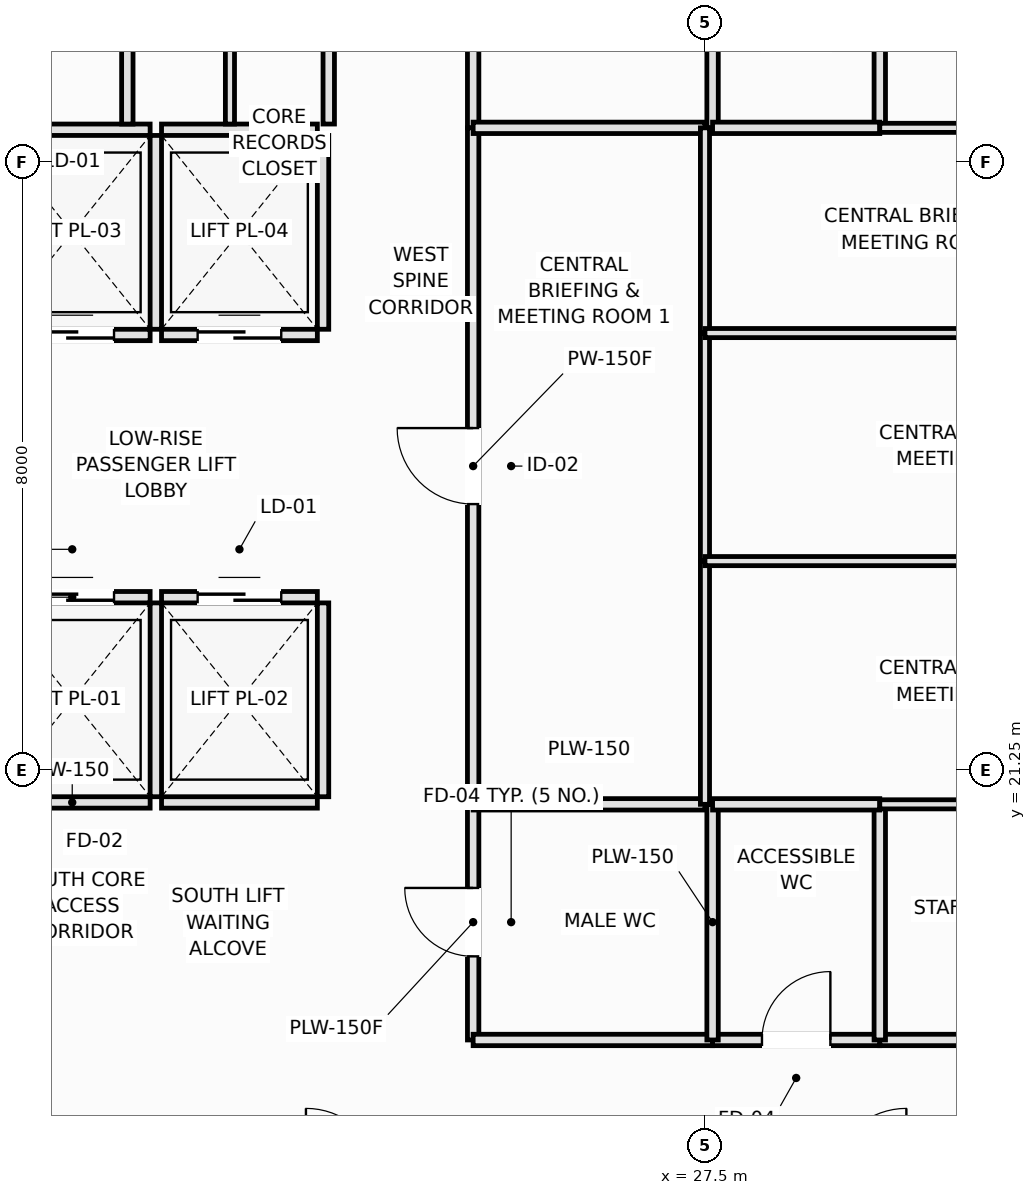
"""IFC4 building model, lengths in metres.
Left out: names, types, materials, properties, quantities, classifications, styles, units other than length and angle.
Written with IfcOpenShell. Run it as: python <this file> out.ifc"""

import sys

from ifc_helpers import new_model, si_unit, direction, frame, frame_2d, origin, place, context, subcontext, project, spatial, rectangle, extrude, element, fill, save


model = new_model("IFC4")
c1 = context("Model", 3, precision=1e-05, world=origin(), true_north=direction((0.0, 1.0)))
c2 = subcontext(c1, "Body", "Model", "MODEL_VIEW")
j1 = project(units=[si_unit("LENGTHUNIT", "METRE"), si_unit("PLANEANGLEUNIT", "RADIAN")], contexts=[c1])
p1 = place(None, origin())
s1 = spatial("IfcSite", under=j1, at=p1, CompositionType="ELEMENT")
p2 = place(p1, origin())
s2 = spatial("IfcBuilding", under=s1, at=p2, CompositionType="ELEMENT")
p3 = place(p2, frame((0.0, 0.0, 75.3)))
s3 = spatial("IfcBuildingStorey", under=s2, at=p3, CompositionType="ELEMENT", Elevation=75.3)
p4 = place(p3, frame((18.15, 20.825, 0.0), z_axis=(0.0, 0.0, 1.0), x_axis=(1.0, 0.0, 0.0)))
e1 = element("IfcWall", 1, at=p4, inside=s3, PredefinedType="PARTITIONING", context=c2, shape_type="SweptSolid", body=[
    extrude(rectangle(XDim=2.05, YDim=0.15, at=frame_2d((1.025, 0.0))), origin(), (0.0, 0.0, 1.0), 3.37),
])
p5 = place(p3, frame((18.15, 23.525, 0.0), z_axis=(0.0, 0.0, 1.0), x_axis=(1.0, 0.0, 0.0)))
e2 = element("IfcWall", 2, at=p5, inside=s3, PredefinedType="PARTITIONING", context=c2, shape_type="SweptSolid", body=[
    extrude(rectangle(XDim=2.05, YDim=0.15, at=frame_2d((1.025, 0.0))), origin(), (0.0, 0.0, 1.0), 3.37),
])
p6 = place(p5, frame((0.475, 0.0, 0.0)))
e3 = element("IfcOpeningElement", 3, at=p6, cuts=e2, PredefinedType="OPENING", context=c2, shape_type="SweptSolid", body=[
    extrude(rectangle(XDim=1.1, YDim=2.2, at=frame_2d((0.55, 1.1))), frame((0.0, 0.085, 0.0), z_axis=(0.0, -1.0, 0.0), x_axis=(1.0, 0.0, 0.0)), (0.0, 0.0, 1.0), 0.17),
])
p7 = place(p3, frame((20.275, 20.9, 0.0), z_axis=(0.0, 0.0, 1.0), x_axis=(0.0, 1.0, 0.0)))
e4 = element("IfcWall", 4, at=p7, inside=s3, PredefinedType="PARTITIONING", context=c2, shape_type="SweptSolid", body=[
    extrude(rectangle(XDim=2.55, YDim=0.15, at=frame_2d((1.275, 0.0))), origin(), (0.0, 0.0, 1.0), 3.37),
])
p8 = place(p3, frame((20.35, 20.825, 0.0), z_axis=(0.0, 0.0, 1.0), x_axis=(1.0, 0.0, 0.0)))
e5 = element("IfcWall", 5, at=p8, inside=s3, PredefinedType="PARTITIONING", context=c2, shape_type="SweptSolid", body=[
    extrude(rectangle(XDim=2.05, YDim=0.15, at=frame_2d((1.025, 0.0))), origin(), (0.0, 0.0, 1.0), 3.37),
])
p9 = place(p3, frame((20.35, 23.525, 0.0), z_axis=(0.0, 0.0, 1.0), x_axis=(1.0, 0.0, 0.0)))
e6 = element("IfcWall", 6, at=p9, inside=s3, PredefinedType="PARTITIONING", context=c2, shape_type="SweptSolid", body=[
    extrude(rectangle(XDim=2.05, YDim=0.15, at=frame_2d((1.025, 0.0))), origin(), (0.0, 0.0, 1.0), 3.37),
])
p10 = place(p9, frame((0.475, 0.0, 0.0)))
e7 = element("IfcOpeningElement", 7, at=p10, cuts=e6, PredefinedType="OPENING", context=c2, shape_type="SweptSolid", body=[
    extrude(rectangle(XDim=1.1, YDim=2.2, at=frame_2d((0.55, 1.1))), frame((0.0, 0.085, 0.0), z_axis=(0.0, -1.0, 0.0), x_axis=(1.0, 0.0, 0.0)), (0.0, 0.0, 1.0), 0.17),
])
p11 = place(p3, frame((22.475, 20.9, 0.0), z_axis=(0.0, 0.0, 1.0), x_axis=(0.0, 1.0, 0.0)))
e8 = element("IfcWall", 8, at=p11, inside=s3, PredefinedType="PARTITIONING", context=c2, shape_type="SweptSolid", body=[
    extrude(rectangle(XDim=2.55, YDim=0.15, at=frame_2d((1.275, 0.0))), origin(), (0.0, 0.0, 1.0), 3.37),
])
p12 = place(p3, frame((18.15, 26.975, 0.0), z_axis=(0.0, 0.0, 1.0), x_axis=(1.0, 0.0, 0.0)))
e9 = element("IfcWall", 9, at=p12, inside=s3, PredefinedType="PARTITIONING", context=c2, shape_type="SweptSolid", body=[
    extrude(rectangle(XDim=2.05, YDim=0.15, at=frame_2d((1.025, 0.0))), origin(), (0.0, 0.0, 1.0), 3.37),
])
p13 = place(p12, frame((0.475, 0.0, 0.0)))
e10 = element("IfcOpeningElement", 10, at=p13, cuts=e9, PredefinedType="OPENING", context=c2, shape_type="SweptSolid", body=[
    extrude(rectangle(XDim=1.1, YDim=2.2, at=frame_2d((0.55, 1.1))), frame((0.0, 0.085, 0.0), z_axis=(0.0, -1.0, 0.0), x_axis=(1.0, 0.0, 0.0)), (0.0, 0.0, 1.0), 0.17),
])
p14 = place(p3, frame((18.15, 29.675, 0.0), z_axis=(0.0, 0.0, 1.0), x_axis=(1.0, 0.0, 0.0)))
e11 = element("IfcWall", 11, at=p14, inside=s3, PredefinedType="PARTITIONING", context=c2, shape_type="SweptSolid", body=[
    extrude(rectangle(XDim=2.05, YDim=0.15, at=frame_2d((1.025, 0.0))), origin(), (0.0, 0.0, 1.0), 3.37),
])
p15 = place(p3, frame((20.275, 27.05, 0.0), z_axis=(0.0, 0.0, 1.0), x_axis=(0.0, 1.0, 0.0)))
e12 = element("IfcWall", 12, at=p15, inside=s3, PredefinedType="PARTITIONING", context=c2, shape_type="SweptSolid", body=[
    extrude(rectangle(XDim=2.55, YDim=0.15, at=frame_2d((1.275, 0.0))), origin(), (0.0, 0.0, 1.0), 3.37),
])
p16 = place(p3, frame((20.35, 26.975, 0.0), z_axis=(0.0, 0.0, 1.0), x_axis=(1.0, 0.0, 0.0)))
e13 = element("IfcWall", 13, at=p16, inside=s3, PredefinedType="PARTITIONING", context=c2, shape_type="SweptSolid", body=[
    extrude(rectangle(XDim=2.05, YDim=0.15, at=frame_2d((1.025, 0.0))), origin(), (0.0, 0.0, 1.0), 3.37),
])
p17 = place(p16, frame((0.475, 0.0, 0.0)))
e14 = element("IfcOpeningElement", 14, at=p17, cuts=e13, PredefinedType="OPENING", context=c2, shape_type="SweptSolid", body=[
    extrude(rectangle(XDim=1.1, YDim=2.2, at=frame_2d((0.55, 1.1))), frame((0.0, 0.085, 0.0), z_axis=(0.0, -1.0, 0.0), x_axis=(1.0, 0.0, 0.0)), (0.0, 0.0, 1.0), 0.17),
])
p18 = place(p3, frame((20.35, 29.675, 0.0), z_axis=(0.0, 0.0, 1.0), x_axis=(1.0, 0.0, 0.0)))
e15 = element("IfcWall", 15, at=p18, inside=s3, PredefinedType="PARTITIONING", context=c2, shape_type="SweptSolid", body=[
    extrude(rectangle(XDim=2.05, YDim=0.15, at=frame_2d((1.025, 0.0))), origin(), (0.0, 0.0, 1.0), 3.37),
])
p19 = place(p3, frame((22.475, 27.05, 0.0), z_axis=(0.0, 0.0, 1.0), x_axis=(0.0, 1.0, 0.0)))
e16 = element("IfcWall", 16, at=p19, inside=s3, PredefinedType="PARTITIONING", context=c2, shape_type="SweptSolid", body=[
    extrude(rectangle(XDim=2.55, YDim=0.15, at=frame_2d((1.275, 0.0))), origin(), (0.0, 0.0, 1.0), 3.37),
])
p20 = place(p3, frame((22.55, 29.75, 0.0), z_axis=(0.0, 0.0, 1.0), x_axis=(0.0, 1.0, 0.0)))
e17 = element("IfcWall", 17, at=p20, inside=s3, PredefinedType="PARTITIONING", context=c2, shape_type="SweptSolid", body=[
    extrude(rectangle(XDim=3.05, YDim=0.15, at=frame_2d((1.525, 0.0))), origin(), (0.0, 0.0, 1.0), 3.01),
])
p21 = place(p20, frame((1.025, 0.0, 0.0)))
e18 = element("IfcOpeningElement", 18, at=p21, cuts=e17, PredefinedType="OPENING", context=c2, shape_type="SweptSolid", body=[
    extrude(rectangle(XDim=1.0, YDim=2.15, at=frame_2d((0.5, 1.075))), frame((0.0, 0.085, 0.0), z_axis=(0.0, -1.0, 0.0), x_axis=(1.0, 0.0, 0.0)), (0.0, 0.0, 1.0), 0.17),
])
p22 = place(p3, frame((24.45, 17.7, 0.0), z_axis=(0.0, 0.0, 1.0), x_axis=(0.0, 1.0, 0.0)))
e19 = element("IfcWall", 19, at=p22, inside=s3, PredefinedType="PLUMBINGWALL", context=c2, shape_type="SweptSolid", body=[
    extrude(rectangle(XDim=3.1, YDim=0.15, at=frame_2d((1.55, 0.0))), origin(), (0.0, 0.0, 1.0), 3.37),
])
p23 = place(p22, frame((1.1, 0.0, 0.0)))
e20 = element("IfcOpeningElement", 20, at=p23, cuts=e19, PredefinedType="OPENING", context=c2, shape_type="SweptSolid", body=[
    extrude(rectangle(XDim=0.9, YDim=2.1, at=frame_2d((0.45, 1.05))), frame((0.0, 0.085, 0.0), z_axis=(0.0, -1.0, 0.0), x_axis=(1.0, 0.0, 0.0)), (0.0, 0.0, 1.0), 0.17),
])
p24 = place(p3, frame((24.45, 29.7, 0.0), z_axis=(0.0, 0.0, 1.0), x_axis=(0.0, 1.0, 0.0)))
e21 = element("IfcWall", 21, at=p24, inside=s3, PredefinedType="PLUMBINGWALL", context=c2, shape_type="SweptSolid", body=[
    extrude(rectangle(XDim=3.1, YDim=0.15, at=frame_2d((1.55, 0.0))), origin(), (0.0, 0.0, 1.0), 3.37),
])
p25 = place(p24, frame((1.1, 0.0, 0.0)))
e22 = element("IfcOpeningElement", 22, at=p25, cuts=e21, PredefinedType="OPENING", context=c2, shape_type="SweptSolid", body=[
    extrude(rectangle(XDim=0.9, YDim=2.1, at=frame_2d((0.45, 1.05))), frame((0.0, 0.085, 0.0), z_axis=(0.0, -1.0, 0.0), x_axis=(1.0, 0.0, 0.0)), (0.0, 0.0, 1.0), 0.17),
])
p26 = place(p3, frame((24.45, 20.8, 0.0), z_axis=(0.0, 0.0, 1.0), x_axis=(0.0, 1.0, 0.0)))
e23 = element("IfcWall", 23, at=p26, inside=s3, PredefinedType="PARTITIONING", context=c2, shape_type="SweptSolid", body=[
    extrude(rectangle(XDim=8.9, YDim=0.15, at=frame_2d((4.45, 0.0))), origin(), (0.0, 0.0, 1.0), 3.37),
])
p27 = place(p26, frame((3.95, 0.0, 0.0)))
e24 = element("IfcOpeningElement", 24, at=p27, cuts=e23, PredefinedType="OPENING", context=c2, shape_type="SweptSolid", body=[
    extrude(rectangle(XDim=1.0, YDim=2.15, at=frame_2d((0.5, 1.075))), frame((0.0, 0.085, 0.0), z_axis=(0.0, -1.0, 0.0), x_axis=(1.0, 0.0, 0.0)), (0.0, 0.0, 1.0), 0.17),
])
p28 = place(p3, frame((19.9, 29.75, 0.0), z_axis=(0.0, 0.0, 1.0), x_axis=(0.0, 1.0, 0.0)))
e25 = element("IfcWall", 25, at=p28, inside=s3, PredefinedType="PARTITIONING", context=c2, shape_type="SweptSolid", body=[
    extrude(rectangle(XDim=3.05, YDim=0.15, at=frame_2d((1.525, 0.0))), origin(), (0.0, 0.0, 1.0), 3.37),
])
p29 = place(p28, frame((1.025, 0.0, 0.0)))
e26 = element("IfcOpeningElement", 26, at=p29, cuts=e25, PredefinedType="OPENING", context=c2, shape_type="SweptSolid", body=[
    extrude(rectangle(XDim=1.0, YDim=2.15, at=frame_2d((0.5, 1.075))), frame((0.0, 0.085, 0.0), z_axis=(0.0, -1.0, 0.0), x_axis=(1.0, 0.0, 0.0)), (0.0, 0.0, 1.0), 0.17),
])
p30 = place(p3, frame((24.45, 17.7, 0.0), z_axis=(0.0, 0.0, 1.0), x_axis=(1.0, 0.0, 0.0)))
e27 = element("IfcWall", 27, at=p30, inside=s3, PredefinedType="PLUMBINGWALL", context=c2, shape_type="SweptSolid", body=[
    extrude(rectangle(XDim=3.15, YDim=0.15, at=frame_2d((1.575, 0.0))), origin(), (0.0, 0.0, 1.0), 3.37),
])
p31 = place(p3, frame((27.6, 17.7, 0.0), z_axis=(0.0, 0.0, 1.0), x_axis=(1.0, 0.0, 0.0)))
e28 = element("IfcWall", 28, at=p31, inside=s3, PredefinedType="PLUMBINGWALL", context=c2, shape_type="SweptSolid", body=[
    extrude(rectangle(XDim=2.2, YDim=0.15, at=frame_2d((1.1, 0.0))), origin(), (0.0, 0.0, 1.0), 3.37),
])
p32 = place(p31, frame((0.65, 0.0, 0.0)))
e29 = element("IfcOpeningElement", 29, at=p32, cuts=e28, PredefinedType="OPENING", context=c2, shape_type="SweptSolid", body=[
    extrude(rectangle(XDim=0.9, YDim=2.1, at=frame_2d((0.45, 1.05))), frame((0.0, 0.085, 0.0), z_axis=(0.0, -1.0, 0.0), x_axis=(1.0, 0.0, 0.0)), (0.0, 0.0, 1.0), 0.17),
])
p33 = place(p3, frame((29.8, 17.7, 0.0), z_axis=(0.0, 0.0, 1.0), x_axis=(1.0, 0.0, 0.0)))
e30 = element("IfcWall", 30, at=p33, inside=s3, PredefinedType="PARTITIONING", context=c2, shape_type="SweptSolid", body=[
    extrude(rectangle(XDim=5.0, YDim=0.15, at=frame_2d((2.5, 0.0))), origin(), (0.0, 0.0, 1.0), 3.37),
])
p34 = place(p3, frame((21.25, 29.75, 0.0), z_axis=(0.0, 0.0, 1.0), x_axis=(0.0, 1.0, 0.0)))
e31 = element("IfcWall", 31, at=p34, inside=s3, PredefinedType="PARTITIONING", context=c2, shape_type="SweptSolid", body=[
    extrude(rectangle(XDim=3.05, YDim=0.12, at=frame_2d((1.525, 0.0))), origin(), (0.0, 0.0, 1.0), 3.37),
])
p35 = place(p3, frame((27.6, 17.7, 0.0), z_axis=(0.0, 0.0, 1.0), x_axis=(0.0, 1.0, 0.0)))
e32 = element("IfcWall", 32, at=p35, inside=s3, PredefinedType="PLUMBINGWALL", context=c2, shape_type="SweptSolid", body=[
    extrude(rectangle(XDim=3.1, YDim=0.15, at=frame_2d((1.55, 0.0))), origin(), (0.0, 0.0, 1.0), 3.37),
])
p36 = place(p3, frame((24.45, 20.8, 0.0), z_axis=(0.0, 0.0, 1.0), x_axis=(1.0, 0.0, 0.0)))
e33 = element("IfcWall", 33, at=p36, inside=s3, PredefinedType="PLUMBINGWALL", context=c2, shape_type="SweptSolid", body=[
    extrude(rectangle(XDim=3.05, YDim=0.15, at=frame_2d((1.525, 0.0))), origin(), (0.0, 0.0, 1.0), 3.37),
])
p37 = place(p3, frame((27.6, 29.7, 0.0), z_axis=(0.0, 0.0, 1.0), x_axis=(0.0, 1.0, 0.0)))
e34 = element("IfcWall", 34, at=p37, inside=s3, PredefinedType="PLUMBINGWALL", context=c2, shape_type="SweptSolid", body=[
    extrude(rectangle(XDim=3.1, YDim=0.15, at=frame_2d((1.55, 0.0))), origin(), (0.0, 0.0, 1.0), 3.37),
])
p38 = place(p3, frame((24.45, 29.7, 0.0), z_axis=(0.0, 0.0, 1.0), x_axis=(1.0, 0.0, 0.0)))
e35 = element("IfcWall", 35, at=p38, inside=s3, PredefinedType="PLUMBINGWALL", context=c2, shape_type="SweptSolid", body=[
    extrude(rectangle(XDim=3.05, YDim=0.15, at=frame_2d((1.525, 0.0))), origin(), (0.0, 0.0, 1.0), 3.37),
])
p39 = place(p3, frame((29.8, 17.7, 0.0), z_axis=(0.0, 0.0, 1.0), x_axis=(0.0, 1.0, 0.0)))
e36 = element("IfcWall", 36, at=p39, inside=s3, PredefinedType="PLUMBINGWALL", context=c2, shape_type="SweptSolid", body=[
    extrude(rectangle(XDim=3.1, YDim=0.15, at=frame_2d((1.55, 0.0))), origin(), (0.0, 0.0, 1.0), 3.37),
])
p40 = place(p3, frame((27.6, 20.8, 0.0), z_axis=(0.0, 0.0, 1.0), x_axis=(1.0, 0.0, 0.0)))
e37 = element("IfcWall", 37, at=p40, inside=s3, PredefinedType="PLUMBINGWALL", context=c2, shape_type="SweptSolid", body=[
    extrude(rectangle(XDim=2.2, YDim=0.15, at=frame_2d((1.1, 0.0))), origin(), (0.0, 0.0, 1.0), 3.37),
])
p41 = place(p3, frame((29.8, 29.7, 0.0), z_axis=(0.0, 0.0, 1.0), x_axis=(0.0, 1.0, 0.0)))
e38 = element("IfcWall", 38, at=p41, inside=s3, PredefinedType="PLUMBINGWALL", context=c2, shape_type="SweptSolid", body=[
    extrude(rectangle(XDim=3.1, YDim=0.15, at=frame_2d((1.55, 0.0))), origin(), (0.0, 0.0, 1.0), 3.37),
])
p42 = place(p3, frame((27.6, 29.7, 0.0), z_axis=(0.0, 0.0, 1.0), x_axis=(1.0, 0.0, 0.0)))
e39 = element("IfcWall", 39, at=p42, inside=s3, PredefinedType="PLUMBINGWALL", context=c2, shape_type="SweptSolid", body=[
    extrude(rectangle(XDim=2.2, YDim=0.15, at=frame_2d((1.1, 0.0))), origin(), (0.0, 0.0, 1.0), 3.37),
])
for number, where, z_axis, x_axis in (
    (40, (29.8, 20.8, 0.0), (0.0, 0.0, 1.0), (1.0, 0.0, 0.0)),
    (41, (29.8, 29.7, 0.0), (0.0, 0.0, 1.0), (1.0, 0.0, 0.0)),
):
    element("IfcWall", number, at=place(p3, frame(where, z_axis=z_axis, x_axis=x_axis)), inside=s3, PredefinedType="PARTITIONING", context=c2, shape_type="SweptSolid", body=[
        extrude(rectangle(XDim=5.0, YDim=0.12, at=frame_2d((2.5, 0.0))), origin(), (0.0, 0.0, 1.0), 3.37),
    ])
p43 = place(p3, frame((27.5, 20.8, 0.0), z_axis=(0.0, 0.0, 1.0), x_axis=(0.0, 1.0, 0.0)))
e42 = element("IfcWall", 42, at=p43, inside=s3, PredefinedType="PARTITIONING", context=c2, shape_type="SweptSolid", body=[
    extrude(rectangle(XDim=3.2, YDim=0.12, at=frame_2d((1.6, 0.0))), origin(), (0.0, 0.0, 1.0), 3.37),
])
p44 = place(p3, frame((27.5, 24.0, 0.0), z_axis=(0.0, 0.0, 1.0), x_axis=(0.0, 1.0, 0.0)))
e43 = element("IfcWall", 43, at=p44, inside=s3, PredefinedType="PARTITIONING", context=c2, shape_type="SweptSolid", body=[
    extrude(rectangle(XDim=3.0, YDim=0.12, at=frame_2d((1.5, 0.0))), origin(), (0.0, 0.0, 1.0), 3.37),
])
p45 = place(p3, frame((27.5, 27.0, 0.0), z_axis=(0.0, 0.0, 1.0), x_axis=(0.0, 1.0, 0.0)))
e44 = element("IfcWall", 44, at=p45, inside=s3, PredefinedType="PARTITIONING", context=c2, shape_type="SweptSolid", body=[
    extrude(rectangle(XDim=2.7, YDim=0.12, at=frame_2d((1.35, 0.0))), origin(), (0.0, 0.0, 1.0), 3.37),
])
for number, where, z_axis, x_axis in (
    (45, (27.5, 24.0, 0.0), (0.0, 0.0, 1.0), (1.0, 0.0, 0.0)),
    (46, (27.5, 27.0, 0.0), (0.0, 0.0, 1.0), (1.0, 0.0, 0.0)),
):
    element("IfcWall", number, at=place(p3, frame(where, z_axis=z_axis, x_axis=x_axis)), inside=s3, PredefinedType="PARTITIONING", context=c2, shape_type="SweptSolid", body=[
        extrude(rectangle(XDim=7.3, YDim=0.12, at=frame_2d((3.65, 0.0))), origin(), (0.0, 0.0, 1.0), 3.37),
    ])
p46 = place(p6, origin())
e47 = element("IfcDoor", 47, at=p46, inside=s3, OperationType="DOUBLE_DOOR_SLIDING", PredefinedType="DOOR", context=c2, shape_type="SweptSolid", body=[
    extrude(rectangle(XDim=1.1, YDim=2.2, at=frame_2d((0.55, 1.1))), frame((0.0, 0.025, 0.0), z_axis=(0.0, -1.0, 0.0), x_axis=(1.0, 0.0, 0.0)), (0.0, 0.0, 1.0), 0.05),
])
fill(e3, e47)
p47 = place(p10, origin())
e48 = element("IfcDoor", 48, at=p47, inside=s3, OperationType="DOUBLE_DOOR_SLIDING", PredefinedType="DOOR", context=c2, shape_type="SweptSolid", body=[
    extrude(rectangle(XDim=1.1, YDim=2.2, at=frame_2d((0.55, 1.1))), frame((0.0, 0.025, 0.0), z_axis=(0.0, -1.0, 0.0), x_axis=(1.0, 0.0, 0.0)), (0.0, 0.0, 1.0), 0.05),
])
fill(e7, e48)
p48 = place(p13, origin())
e49 = element("IfcDoor", 49, at=p48, inside=s3, OperationType="DOUBLE_DOOR_SLIDING", PredefinedType="DOOR", context=c2, shape_type="SweptSolid", body=[
    extrude(rectangle(XDim=1.1, YDim=2.2, at=frame_2d((0.55, 1.1))), frame((0.0, 0.025, 0.0), z_axis=(0.0, -1.0, 0.0), x_axis=(1.0, 0.0, 0.0)), (0.0, 0.0, 1.0), 0.05),
])
fill(e10, e49)
p49 = place(p17, origin())
e50 = element("IfcDoor", 50, at=p49, inside=s3, OperationType="DOUBLE_DOOR_SLIDING", PredefinedType="DOOR", context=c2, shape_type="SweptSolid", body=[
    extrude(rectangle(XDim=1.1, YDim=2.2, at=frame_2d((0.55, 1.1))), frame((0.0, 0.025, 0.0), z_axis=(0.0, -1.0, 0.0), x_axis=(1.0, 0.0, 0.0)), (0.0, 0.0, 1.0), 0.05),
])
fill(e14, e50)
p50 = place(p23, origin())
e51 = element("IfcDoor", 51, at=p50, inside=s3, OperationType="SINGLE_SWING_RIGHT", PredefinedType="DOOR", context=c2, shape_type="SweptSolid", body=[
    extrude(rectangle(XDim=0.9, YDim=2.1, at=frame_2d((0.45, 1.05))), frame((0.0, 0.025, 0.0), z_axis=(0.0, -1.0, 0.0), x_axis=(1.0, 0.0, 0.0)), (0.0, 0.0, 1.0), 0.05),
])
fill(e20, e51)
p51 = place(p27, origin())
e52 = element("IfcDoor", 52, at=p51, inside=s3, OperationType="SINGLE_SWING_RIGHT", PredefinedType="DOOR", context=c2, shape_type="SweptSolid", body=[
    extrude(rectangle(XDim=1.0, YDim=2.15, at=frame_2d((0.5, 1.075))), frame((0.0, 0.025, 0.0), z_axis=(0.0, -1.0, 0.0), x_axis=(1.0, 0.0, 0.0)), (0.0, 0.0, 1.0), 0.05),
])
fill(e24, e52)
p52 = place(p32, origin())
e53 = element("IfcDoor", 53, at=p52, inside=s3, OperationType="SINGLE_SWING_RIGHT", PredefinedType="DOOR", context=c2, shape_type="SweptSolid", body=[
    extrude(rectangle(XDim=0.9, YDim=2.1, at=frame_2d((0.45, 1.05))), frame((0.0, 0.025, 0.0), z_axis=(0.0, -1.0, 0.0), x_axis=(1.0, 0.0, 0.0)), (0.0, 0.0, 1.0), 0.05),
])
fill(e29, e53)
save(model, sys.argv[1])
